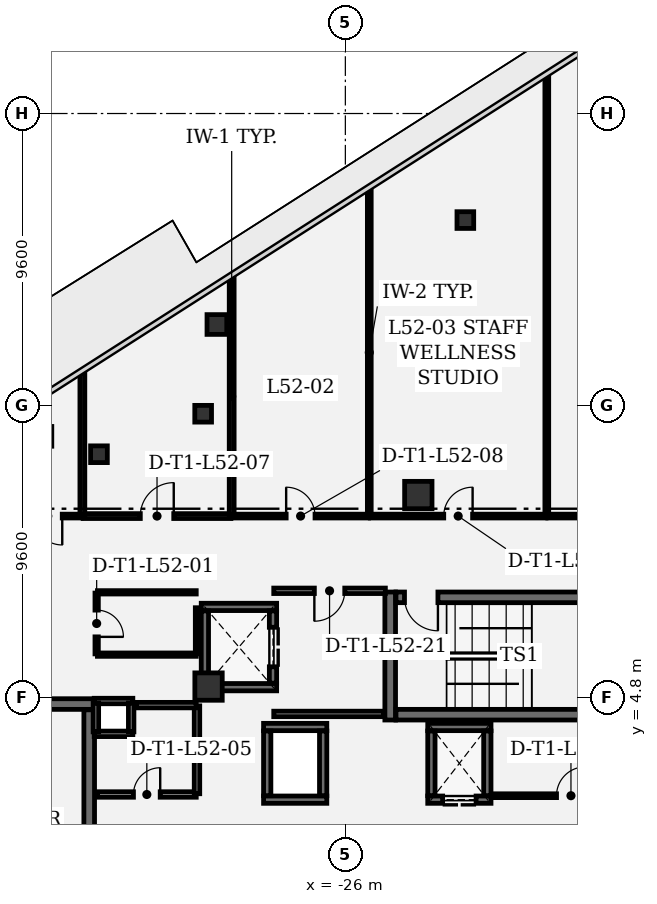
"""IFC4 building model, lengths in metres.
Left out: names, types, materials, properties, quantities, classifications, styles, units other than length and angle.
Written with IfcOpenShell. Run it as: python <this file> out.ifc"""

import sys

from ifc_helpers import new_model, si_unit, direction, frame, frame_2d, origin, origin_2d, place, context, subcontext, project, spatial, rectangle, extrude, element, fill, save


model = new_model("IFC4")
c1 = context("Model", 3, precision=1e-05, world=origin(), true_north=direction((0.0, 1.0)))
c2 = subcontext(c1, "Body", "Model", "MODEL_VIEW")
j1 = project(units=[si_unit("LENGTHUNIT", "METRE"), si_unit("PLANEANGLEUNIT", "RADIAN")], contexts=[c1])
p1 = place(None, origin())
s1 = spatial("IfcSite", under=j1, at=p1, CompositionType="ELEMENT")
p2 = place(p1, origin())
s2 = spatial("IfcBuilding", under=s1, at=p2, CompositionType="ELEMENT")
p3 = place(p2, frame((0.0, 0.0, 225.3)))
s3 = spatial("IfcBuildingStorey", under=s2, at=p3, CompositionType="ELEMENT", Elevation=225.3)
for number, where, z_axis, x_axis in (
    (1, (-23.6, 11.45, 0.0), (0.0, 0.0, 1.0), (1.0, 0.0, 0.0)),
    (2, (-30.5, 5.15, 0.0), (0.0, 0.0, 1.0), (1.0, 0.0, 0.0)),
):
    element("IfcColumn", number, at=place(p3, frame(where, z_axis=z_axis, x_axis=x_axis)), inside=s3, PredefinedType="COLUMN", context=c2, shape_type="SweptSolid", body=[
        extrude(rectangle(XDim=0.9, YDim=0.9, at=origin_2d()), origin(), (0.0, 0.0, 1.0), 4.05),
    ])
p4 = place(p3, frame((-30.225, 17.06, 0.0), z_axis=(0.0, 0.0, 1.0), x_axis=(1.0, 0.0, 0.0)))
e3 = element("IfcColumn", 3, at=p4, inside=s3, PredefinedType="COLUMN", context=c2, shape_type="SweptSolid", body=[
    extrude(rectangle(XDim=0.65, YDim=0.65, at=origin_2d()), origin(), (0.0, 0.0, 1.0), 4.05),
])
for number, where, z_axis, x_axis in (
    (4, (-34.104, 12.792, 0.0), (0.0, 0.0, 1.0), (1.0, 0.0, 0.0)),
    (5, (-22.053, 20.495, 0.0), (0.0, 0.0, 1.0), (1.0, 0.0, 0.0)),
    (6, (-30.677, 14.124, 0.0), (0.0, 0.0, 1.0), (1.0, 0.0, 0.0)),
):
    element("IfcColumn", number, at=place(p3, frame(where, z_axis=z_axis, x_axis=x_axis)), inside=s3, PredefinedType="COLUMN", context=c2, shape_type="SweptSolid", body=[
        extrude(rectangle(XDim=0.55, YDim=0.55, at=origin_2d()), origin(), (0.0, 0.0, 1.0), 4.05),
    ])
p5 = place(p3, frame((-24.525, 8.26, 0.0), z_axis=(0.0, 0.0, 1.0), x_axis=(0.0, -1.0, 0.0)))
e7 = element("IfcWall", 7, at=p5, inside=s3, PredefinedType="SHEAR", context=c2, shape_type="SweptSolid", body=[
    extrude(rectangle(XDim=4.21, YDim=0.35, at=frame_2d((2.105, 0.0))), origin(), (0.0, 0.0, 1.0), 3.78),
])
p6 = place(p3, frame((-24.335, 4.225, 0.0), z_axis=(0.0, 0.0, 1.0), x_axis=(1.0, 0.0, 0.0)))
e8 = element("IfcWall", 8, at=p6, inside=s3, PredefinedType="SHEAR", context=c2, shape_type="SweptSolid", body=[
    extrude(rectangle(XDim=8.12, YDim=0.35, at=frame_2d((4.06, 0.0))), origin(), (0.0, 0.0, 1.0), 3.78),
])
p7 = place(p3, frame((-16.215, 8.085, 0.0), z_axis=(0.0, 0.0, 1.0), x_axis=(-1.0, 0.0, 0.0)))
e9 = element("IfcWall", 9, at=p7, inside=s3, PredefinedType="SHEAR", context=c2, shape_type="SweptSolid", body=[
    extrude(rectangle(XDim=8.12, YDim=0.35, at=frame_2d((4.06, 0.0))), origin(), (0.0, 0.0, 1.0), 3.78),
])
p8 = place(p7, frame((6.74, 0.0, 0.0)))
e10 = element("IfcOpeningElement", 10, at=p8, cuts=e9, PredefinedType="OPENING", context=c2, shape_type="SweptSolid", body=[
    extrude(rectangle(XDim=1.1, YDim=2.2, at=frame_2d((0.55, 1.1))), frame((0.0, 0.185, 0.0), z_axis=(0.0, -1.0, 0.0), x_axis=(1.0, 0.0, 0.0)), (0.0, 0.0, 1.0), 0.37),
])
p9 = place(p3, frame((-34.25, 4.575, 0.0), z_axis=(0.0, 0.0, 1.0), x_axis=(-1.0, 0.0, 0.0)))
e11 = element("IfcWall", 11, at=p9, inside=s3, PredefinedType="SHEAR", context=c2, shape_type="SweptSolid", body=[
    extrude(rectangle(XDim=4.21, YDim=0.35, at=frame_2d((2.105, 0.0))), origin(), (0.0, 0.0, 1.0), 3.78),
])
p10 = place(p3, frame((-34.425, -4.385, 0.0), z_axis=(0.0, 0.0, 1.0), x_axis=(0.0, 1.0, 0.0)))
e12 = element("IfcWall", 12, at=p10, inside=s3, PredefinedType="SHEAR", context=c2, shape_type="SweptSolid", body=[
    extrude(rectangle(XDim=8.77, YDim=0.35, at=frame_2d((4.385, 0.0))), origin(), (0.0, 0.0, 1.0), 3.78),
])
for number, where, z_axis, x_axis in (
    (13, (-28.26, 5.13, 0.0), (0.0, 0.0, 1.0), (-1.0, 0.0, 0.0)),
    (14, (-30.74, 7.77, 0.0), (0.0, 0.0, 1.0), (1.0, 0.0, 0.0)),
):
    element("IfcWall", number, at=place(p3, frame(where, z_axis=z_axis, x_axis=x_axis)), inside=s3, PredefinedType="SHEAR", context=c2, shape_type="SweptSolid", body=[
        extrude(rectangle(XDim=2.48, YDim=0.24, at=frame_2d((1.24, 0.0))), origin(), (0.0, 0.0, 1.0), 3.78),
    ])
p11 = place(p3, frame((-30.62, 5.262, 0.0), z_axis=(0.0, 0.0, 1.0), x_axis=(0.0, 1.0, 0.0)))
e15 = element("IfcWall", 15, at=p11, inside=s3, PredefinedType="SHEAR", context=c2, shape_type="SweptSolid", body=[
    extrude(rectangle(XDim=2.376, YDim=0.24, at=frame_2d((1.188, 0.0))), origin(), (0.0, 0.0, 1.0), 3.78),
])
p12 = place(p3, frame((-28.38, 7.638, 0.0), z_axis=(0.0, 0.0, 1.0), x_axis=(0.0, -1.0, 0.0)))
e16 = element("IfcWall", 16, at=p12, inside=s3, PredefinedType="SHEAR", context=c2, shape_type="SweptSolid", body=[
    extrude(rectangle(XDim=2.376, YDim=0.24, at=frame_2d((1.188, 0.0))), origin(), (0.0, 0.0, 1.0), 3.78),
])
p13 = place(p12, frame((0.538, 0.0, 0.0)))
e17 = element("IfcOpeningElement", 17, at=p13, cuts=e16, PredefinedType="OPENING", context=c2, shape_type="SweptSolid", body=[
    extrude(rectangle(XDim=1.3, YDim=2.3, at=frame_2d((0.65, 1.15))), frame((0.0, 0.13, 0.0), z_axis=(0.0, -1.0, 0.0), x_axis=(1.0, 0.0, 0.0)), (0.0, 0.0, 1.0), 0.26),
])
for number, where, z_axis, x_axis in (
    (18, (-26.61, 1.43, 0.0), (0.0, 0.0, 1.0), (-1.0, 0.0, 0.0)),
    (19, (-28.69, 3.82, 0.0), (0.0, 0.0, 1.0), (1.0, 0.0, 0.0)),
):
    element("IfcWall", number, at=place(p3, frame(where, z_axis=z_axis, x_axis=x_axis)), inside=s3, PredefinedType="SHEAR", context=c2, shape_type="SweptSolid", body=[
        extrude(rectangle(XDim=2.08, YDim=0.24, at=frame_2d((1.04, 0.0))), origin(), (0.0, 0.0, 1.0), 3.78),
    ])
for number, where, z_axis, x_axis in (
    (20, (-28.57, 1.562, 0.0), (0.0, 0.0, 1.0), (0.0, 1.0, 0.0)),
    (21, (-26.73, 3.688, 0.0), (0.0, 0.0, 1.0), (0.0, -1.0, 0.0)),
):
    element("IfcWall", number, at=place(p3, frame(where, z_axis=z_axis, x_axis=x_axis)), inside=s3, PredefinedType="SHEAR", context=c2, shape_type="SweptSolid", body=[
        extrude(rectangle(XDim=2.126, YDim=0.24, at=frame_2d((1.063, 0.0))), origin(), (0.0, 0.0, 1.0), 3.78),
    ])
p14 = place(p3, frame((-21.21, 1.43, 0.0), z_axis=(0.0, 0.0, 1.0), x_axis=(-1.0, 0.0, 0.0)))
e22 = element("IfcWall", 22, at=p14, inside=s3, PredefinedType="SHEAR", context=c2, shape_type="SweptSolid", body=[
    extrude(rectangle(XDim=2.08, YDim=0.24, at=frame_2d((1.04, 0.0))), origin(), (0.0, 0.0, 1.0), 3.78),
])
p15 = place(p14, frame((0.49, 0.0, 0.0)))
e23 = element("IfcOpeningElement", 23, at=p15, cuts=e22, PredefinedType="OPENING", context=c2, shape_type="SweptSolid", body=[
    extrude(rectangle(XDim=1.1, YDim=2.2, at=frame_2d((0.55, 1.1))), frame((0.0, 0.13, 0.0), z_axis=(0.0, -1.0, 0.0), x_axis=(1.0, 0.0, 0.0)), (0.0, 0.0, 1.0), 0.26),
])
p16 = place(p3, frame((-23.29, 3.82, 0.0), z_axis=(0.0, 0.0, 1.0), x_axis=(1.0, 0.0, 0.0)))
e24 = element("IfcWall", 24, at=p16, inside=s3, PredefinedType="SHEAR", context=c2, shape_type="SweptSolid", body=[
    extrude(rectangle(XDim=2.08, YDim=0.24, at=frame_2d((1.04, 0.0))), origin(), (0.0, 0.0, 1.0), 3.78),
])
for number, where, z_axis, x_axis in (
    (25, (-23.17, 1.562, 0.0), (0.0, 0.0, 1.0), (0.0, 1.0, 0.0)),
    (26, (-21.33, 3.688, 0.0), (0.0, 0.0, 1.0), (0.0, -1.0, 0.0)),
):
    element("IfcWall", number, at=place(p3, frame(where, z_axis=z_axis, x_axis=x_axis)), inside=s3, PredefinedType="SHEAR", context=c2, shape_type="SweptSolid", body=[
        extrude(rectangle(XDim=2.126, YDim=0.24, at=frame_2d((1.063, 0.0))), origin(), (0.0, 0.0, 1.0), 3.78),
    ])
for number, where, z_axis, x_axis in (
    (27, (-32.99, 3.595, 0.0), (0.0, 0.0, 1.0), (-1.0, 0.0, 0.0)),
    (28, (-34.26, 4.675, 0.0), (0.0, 0.0, 1.0), (1.0, 0.0, 0.0)),
):
    element("IfcWall", number, at=place(p3, frame(where, z_axis=z_axis, x_axis=x_axis)), inside=s3, PredefinedType="PARTITIONING", context=c2, shape_type="SweptSolid", body=[
        extrude(rectangle(XDim=1.27, YDim=0.18, at=frame_2d((0.635, 0.0))), origin(), (0.0, 0.0, 1.0), 3.78),
    ])
for number, where, z_axis, x_axis in (
    (29, (-34.205, 3.66, 0.0), (0.0, 0.0, 1.0), (0.0, 1.0, 0.0)),
    (30, (-33.045, 4.61, 0.0), (0.0, 0.0, 1.0), (0.0, -1.0, 0.0)),
):
    element("IfcWall", number, at=place(p3, frame(where, z_axis=z_axis, x_axis=x_axis)), inside=s3, PredefinedType="PARTITIONING", context=c2, shape_type="SweptSolid", body=[
        extrude(rectangle(XDim=0.95, YDim=0.18, at=frame_2d((0.475, 0.0))), origin(), (0.0, 0.0, 1.0), 3.78),
    ])
p17 = place(p3, frame((-28.355, 4.25, 0.0), z_axis=(0.0, 0.0, 1.0), x_axis=(1.0, 0.0, 0.0)))
e31 = element("IfcWall", 31, at=p17, inside=s3, PredefinedType="PARTITIONING", context=c2, shape_type="SweptSolid", body=[
    extrude(rectangle(XDim=3.622, YDim=0.18, at=frame_2d((1.811, 0.0))), origin(), (0.0, 0.0, 1.0), 3.78),
])
p18 = place(p3, frame((-24.684, 8.3, 0.0), z_axis=(0.0, 0.0, 1.0), x_axis=(-1.0, 0.0, 0.0)))
e32 = element("IfcWall", 32, at=p18, inside=s3, PredefinedType="PARTITIONING", context=c2, shape_type="SweptSolid", body=[
    extrude(rectangle(XDim=3.671, YDim=0.18, at=frame_2d((1.835, 0.0))), origin(), (0.0, 0.0, 1.0), 3.78),
])
p19 = place(p18, frame((1.335, 0.0, 0.0)))
e33 = element("IfcOpeningElement", 33, at=p19, cuts=e32, PredefinedType="OPENING", context=c2, shape_type="SweptSolid", body=[
    extrude(rectangle(XDim=1.0, YDim=2.15, at=frame_2d((0.5, 1.075))), frame((0.0, 0.1, 0.0), z_axis=(0.0, -1.0, 0.0), x_axis=(1.0, 0.0, 0.0)), (0.0, 0.0, 1.0), 0.2),
])
p20 = place(p3, frame((-34.18, 8.225, 0.0), z_axis=(0.0, 0.0, 1.0), x_axis=(0.0, -1.0, 0.0)))
e34 = element("IfcWall", 34, at=p20, inside=s3, PredefinedType="PARTITIONING", context=c2, shape_type="SweptSolid", body=[
    extrude(rectangle(XDim=2.0, YDim=0.11, at=frame_2d((1.0, 0.0))), origin(), (0.0, 0.0, 1.0), 3.78),
])
p21 = place(p20, frame((0.56, 0.0, 0.0)))
e35 = element("IfcOpeningElement", 35, at=p21, cuts=e34, PredefinedType="OPENING", context=c2, shape_type="SweptSolid", body=[
    extrude(rectangle(XDim=0.88, YDim=2.1, at=frame_2d((0.44, 1.05))), frame((0.0, 0.065, 0.0), z_axis=(0.0, -1.0, 0.0), x_axis=(1.0, 0.0, 0.0)), (0.0, 0.0, 1.0), 0.13),
])
p22 = place(p3, frame((-34.155, 6.2, 0.0), z_axis=(0.0, 0.0, 1.0), x_axis=(1.0, 0.0, 0.0)))
e36 = element("IfcWall", 36, at=p22, inside=s3, PredefinedType="PARTITIONING", context=c2, shape_type="SweptSolid", body=[
    extrude(rectangle(XDim=3.25, YDim=0.11, at=frame_2d((1.625, 0.0))), origin(), (0.0, 0.0, 1.0), 3.344),
])
p23 = place(p3, frame((-30.88, 6.225, 0.0), z_axis=(0.0, 0.0, 1.0), x_axis=(0.0, 1.0, 0.0)))
e37 = element("IfcWall", 37, at=p23, inside=s3, PredefinedType="PARTITIONING", context=c2, shape_type="SweptSolid", body=[
    extrude(rectangle(XDim=1.518, YDim=0.11, at=frame_2d((0.759, 0.0))), origin(), (0.0, 0.0, 1.0), 3.78),
])
p24 = place(p3, frame((-30.905, 8.25, 0.0), z_axis=(0.0, 0.0, 1.0), x_axis=(-1.0, 0.0, 0.0)))
e38 = element("IfcWall", 38, at=p24, inside=s3, PredefinedType="PARTITIONING", context=c2, shape_type="SweptSolid", body=[
    extrude(rectangle(XDim=3.25, YDim=0.11, at=frame_2d((1.625, 0.0))), origin(), (0.0, 0.0, 1.0), 3.78),
])
p25 = place(p3, frame((-21.134, 1.56, 0.0), z_axis=(0.0, 0.0, 1.0), x_axis=(1.0, 0.0, 0.0)))
e39 = element("IfcWall", 39, at=p25, inside=s3, PredefinedType="PARTITIONING", context=c2, shape_type="SweptSolid", body=[
    extrude(rectangle(XDim=5.109, YDim=0.125, at=frame_2d((2.554, 0.0))), origin(), (0.0, 0.0, 1.0), 3.78),
])
p26 = place(p25, frame((2.079, 0.0, 0.0)))
e40 = element("IfcOpeningElement", 40, at=p26, cuts=e39, PredefinedType="OPENING", context=c2, shape_type="SweptSolid", body=[
    extrude(rectangle(XDim=0.95, YDim=2.15, at=frame_2d((0.475, 1.075))), frame((0.0, 0.073, 0.0), z_axis=(0.0, -1.0, 0.0), x_axis=(1.0, 0.0, 0.0)), (0.0, 0.0, 1.0), 0.145),
])
p27 = place(p3, frame((-34.155, 1.6, 0.0), z_axis=(0.0, 0.0, 1.0), x_axis=(1.0, 0.0, 0.0)))
e41 = element("IfcWall", 41, at=p27, inside=s3, PredefinedType="PARTITIONING", context=c2, shape_type="SweptSolid", body=[
    extrude(rectangle(XDim=3.25, YDim=0.18, at=frame_2d((1.625, 0.0))), origin(), (0.0, 0.0, 1.0), 3.78),
])
p28 = place(p27, frame((1.185, 0.0, 0.0)))
e42 = element("IfcOpeningElement", 42, at=p28, cuts=e41, PredefinedType="OPENING", context=c2, shape_type="SweptSolid", body=[
    extrude(rectangle(XDim=0.88, YDim=2.1, at=frame_2d((0.44, 1.05))), frame((0.0, 0.1, 0.0), z_axis=(0.0, -1.0, 0.0), x_axis=(1.0, 0.0, 0.0)), (0.0, 0.0, 1.0), 0.2),
])
p29 = place(p3, frame((-30.88, 1.625, 0.0), z_axis=(0.0, 0.0, 1.0), x_axis=(0.0, 1.0, 0.0)))
e43 = element("IfcWall", 43, at=p29, inside=s3, PredefinedType="PARTITIONING", context=c2, shape_type="SweptSolid", body=[
    extrude(rectangle(XDim=2.89, YDim=0.18, at=frame_2d((1.445, 0.0))), origin(), (0.0, 0.0, 1.0), 3.78),
])
p30 = place(p3, frame((-30.905, 4.54, 0.0), z_axis=(0.0, 0.0, 1.0), x_axis=(-1.0, 0.0, 0.0)))
e44 = element("IfcWall", 44, at=p30, inside=s3, PredefinedType="PARTITIONING", context=c2, shape_type="SweptSolid", body=[
    extrude(rectangle(XDim=1.975, YDim=0.18, at=frame_2d((0.988, 0.0))), origin(), (0.0, 0.0, 1.0), 3.78),
])
p31 = place(p3, frame((-34.625, 10.758, 0.0), z_axis=(0.0, 0.0, 1.0), x_axis=(1.0, 0.0, 0.0)))
e45 = element("IfcWall", 45, at=p31, inside=s3, PredefinedType="PARTITIONING", context=c2, shape_type="SweptSolid", body=[
    extrude(rectangle(XDim=4.861, YDim=0.16, at=frame_2d((2.431, 0.0))), origin(), (0.0, 0.0, 1.0), 3.0),
])
p32 = place(p31, frame((1.881, 0.0, 0.0)))
e46 = element("IfcOpeningElement", 46, at=p32, cuts=e45, PredefinedType="OPENING", context=c2, shape_type="SweptSolid", body=[
    extrude(rectangle(XDim=1.1, YDim=2.15, at=frame_2d((0.55, 1.075))), frame((0.0, 0.09, 0.0), z_axis=(0.0, -1.0, 0.0), x_axis=(1.0, 0.0, 0.0)), (0.0, 0.0, 1.0), 0.18),
])
p33 = place(p3, frame((-29.739, 10.783, 0.0), z_axis=(0.0, 0.0, 1.0), x_axis=(0.0, 1.0, 0.0)))
e47 = element("IfcWall", 47, at=p33, inside=s3, PredefinedType="PARTITIONING", context=c2, shape_type="SweptSolid", body=[
    extrude(rectangle(XDim=7.818, YDim=0.16, at=frame_2d((3.909, 0.0))), origin(), (0.0, 0.0, 1.0), 3.78),
])
p34 = place(p3, frame((-34.65, 15.462, 0.0), z_axis=(0.0, 0.0, 1.0), x_axis=(0.0, -1.0, 0.0)))
e48 = element("IfcWall", 48, at=p34, inside=s3, PredefinedType="PARTITIONING", context=c2, shape_type="SweptSolid", body=[
    extrude(rectangle(XDim=4.679, YDim=0.16, at=frame_2d((2.339, 0.0))), origin(), (0.0, 0.0, 1.0), 3.78),
])
p35 = place(p3, frame((-29.706, 10.758, 0.0), z_axis=(0.0, 0.0, 1.0), x_axis=(1.0, 0.0, 0.0)))
e49 = element("IfcWall", 49, at=p35, inside=s3, PredefinedType="PARTITIONING", context=c2, shape_type="SweptSolid", body=[
    extrude(rectangle(XDim=4.468, YDim=0.125, at=frame_2d((2.234, 0.0))), origin(), (0.0, 0.0, 1.0), 3.78),
])
p36 = place(p35, frame((1.759, 0.0, 0.0)))
e50 = element("IfcOpeningElement", 50, at=p36, cuts=e49, PredefinedType="OPENING", context=c2, shape_type="SweptSolid", body=[
    extrude(rectangle(XDim=0.95, YDim=2.15, at=frame_2d((0.475, 1.075))), frame((0.0, 0.073, 0.0), z_axis=(0.0, -1.0, 0.0), x_axis=(1.0, 0.0, 0.0)), (0.0, 0.0, 1.0), 0.145),
])
p37 = place(p3, frame((-25.213, 10.783, 0.0), z_axis=(0.0, 0.0, 1.0), x_axis=(0.0, 1.0, 0.0)))
e51 = element("IfcWall", 51, at=p37, inside=s3, PredefinedType="PARTITIONING", context=c2, shape_type="SweptSolid", body=[
    extrude(rectangle(XDim=10.71, YDim=0.125, at=frame_2d((5.355, 0.0))), origin(), (0.0, 0.0, 1.0), 3.78),
])
p38 = place(p3, frame((-25.18, 10.758, 0.0), z_axis=(0.0, 0.0, 1.0), x_axis=(1.0, 0.0, 0.0)))
e52 = element("IfcWall", 52, at=p38, inside=s3, PredefinedType="PARTITIONING", context=c2, shape_type="SweptSolid", body=[
    extrude(rectangle(XDim=5.781, YDim=0.125, at=frame_2d((2.89, 0.0))), origin(), (0.0, 0.0, 1.0), 3.78),
])
p39 = place(p38, frame((2.415, 0.0, 0.0)))
e53 = element("IfcOpeningElement", 53, at=p39, cuts=e52, PredefinedType="OPENING", context=c2, shape_type="SweptSolid", body=[
    extrude(rectangle(XDim=0.95, YDim=2.15, at=frame_2d((0.475, 1.075))), frame((0.0, 0.073, 0.0), z_axis=(0.0, -1.0, 0.0), x_axis=(1.0, 0.0, 0.0)), (0.0, 0.0, 1.0), 0.145),
])
p40 = place(p3, frame((-19.374, 10.783, 0.0), z_axis=(0.0, 0.0, 1.0), x_axis=(0.0, 1.0, 0.0)))
e54 = element("IfcWall", 54, at=p40, inside=s3, PredefinedType="PARTITIONING", context=c2, shape_type="SweptSolid", body=[
    extrude(rectangle(XDim=14.442, YDim=0.125, at=frame_2d((7.221, 0.0))), origin(), (0.0, 0.0, 1.0), 2.977),
])
p41 = place(p3, frame((-19.341, 10.758, 0.0), z_axis=(0.0, 0.0, 1.0), x_axis=(1.0, 0.0, 0.0)))
e55 = element("IfcWall", 55, at=p41, inside=s3, PredefinedType="PARTITIONING", context=c2, shape_type="SweptSolid", body=[
    extrude(rectangle(XDim=6.166, YDim=0.125, at=frame_2d((3.083, 0.0))), origin(), (0.0, 0.0, 1.0), 3.344),
])
p42 = place(p41, frame((2.981, 0.0, 0.0)))
e56 = element("IfcOpeningElement", 56, at=p42, cuts=e55, PredefinedType="OPENING", context=c2, shape_type="SweptSolid", body=[
    extrude(rectangle(XDim=0.95, YDim=2.15, at=frame_2d((0.475, 1.075))), frame((0.0, 0.073, 0.0), z_axis=(0.0, -1.0, 0.0), x_axis=(1.0, 0.0, 0.0)), (0.0, 0.0, 1.0), 0.145),
])
p43 = place(p3, frame((-34.683, 10.758, 0.0), z_axis=(0.0, 0.0, 1.0), x_axis=(-1.0, 0.0, 0.0)))
e57 = element("IfcWall", 57, at=p43, inside=s3, PredefinedType="PARTITIONING", context=c2, shape_type="SweptSolid", body=[
    extrude(rectangle(XDim=3.15, YDim=0.125, at=frame_2d((1.575, 0.0))), origin(), (0.0, 0.0, 1.0), 3.0),
])
p44 = place(p43, frame((0.629, 0.0, 0.0)))
e58 = element("IfcOpeningElement", 58, at=p44, cuts=e57, PredefinedType="OPENING", context=c2, shape_type="SweptSolid", body=[
    extrude(rectangle(XDim=0.95, YDim=2.15, at=frame_2d((0.475, 1.075))), frame((0.0, 0.073, 0.0), z_axis=(0.0, -1.0, 0.0), x_axis=(1.0, 0.0, 0.0)), (0.0, 0.0, 1.0), 0.145),
])
p45 = place(p8, origin())
e59 = element("IfcDoor", 59, at=p45, inside=s3, OperationType="SINGLE_SWING_LEFT", PredefinedType="DOOR", context=c2, shape_type="SweptSolid", body=[
    extrude(rectangle(XDim=1.1, YDim=2.2, at=frame_2d((0.55, 1.1))), frame((0.0, 0.025, 0.0), z_axis=(0.0, -1.0, 0.0), x_axis=(1.0, 0.0, 0.0)), (0.0, 0.0, 1.0), 0.05),
])
fill(e10, e59)
p46 = place(p13, origin())
e60 = element("IfcDoor", 60, at=p46, inside=s3, OperationType="DOUBLE_DOOR_SLIDING", PredefinedType="DOOR", context=c2, shape_type="SweptSolid", body=[
    extrude(rectangle(XDim=1.3, YDim=2.3, at=frame_2d((0.65, 1.15))), frame((0.0, 0.025, 0.0), z_axis=(0.0, -1.0, 0.0), x_axis=(1.0, 0.0, 0.0)), (0.0, 0.0, 1.0), 0.05),
])
fill(e17, e60)
p47 = place(p15, origin())
e61 = element("IfcDoor", 61, at=p47, inside=s3, OperationType="DOUBLE_DOOR_SLIDING", PredefinedType="DOOR", context=c2, shape_type="SweptSolid", body=[
    extrude(rectangle(XDim=1.1, YDim=2.2, at=frame_2d((0.55, 1.1))), frame((0.0, 0.025, 0.0), z_axis=(0.0, -1.0, 0.0), x_axis=(1.0, 0.0, 0.0)), (0.0, 0.0, 1.0), 0.05),
])
fill(e23, e61)
p48 = place(p21, origin())
e62 = element("IfcDoor", 62, at=p48, inside=s3, OperationType="SINGLE_SWING_RIGHT", PredefinedType="DOOR", context=c2, shape_type="SweptSolid", body=[
    extrude(rectangle(XDim=0.88, YDim=2.1, at=frame_2d((0.44, 1.05))), frame((0.0, 0.025, 0.0), z_axis=(0.0, -1.0, 0.0), x_axis=(1.0, 0.0, 0.0)), (0.0, 0.0, 1.0), 0.05),
])
fill(e35, e62)
p49 = place(p26, origin())
e63 = element("IfcDoor", 63, at=p49, inside=s3, OperationType="SINGLE_SWING_RIGHT", PredefinedType="DOOR", context=c2, shape_type="SweptSolid", body=[
    extrude(rectangle(XDim=0.95, YDim=2.15, at=frame_2d((0.475, 1.075))), frame((0.0, 0.025, 0.0), z_axis=(0.0, -1.0, 0.0), x_axis=(1.0, 0.0, 0.0)), (0.0, 0.0, 1.0), 0.05),
])
fill(e40, e63)
p50 = place(p28, origin())
e64 = element("IfcDoor", 64, at=p50, inside=s3, OperationType="SINGLE_SWING_RIGHT", PredefinedType="DOOR", context=c2, shape_type="SweptSolid", body=[
    extrude(rectangle(XDim=0.88, YDim=2.1, at=frame_2d((0.44, 1.05))), frame((0.0, 0.025, 0.0), z_axis=(0.0, -1.0, 0.0), x_axis=(1.0, 0.0, 0.0)), (0.0, 0.0, 1.0), 0.05),
])
fill(e42, e64)
p51 = place(p32, origin())
e65 = element("IfcDoor", 65, at=p51, inside=s3, OperationType="SINGLE_SWING_RIGHT", PredefinedType="DOOR", context=c2, shape_type="SweptSolid", body=[
    extrude(rectangle(XDim=1.1, YDim=2.15, at=frame_2d((0.55, 1.075))), frame((0.0, 0.025, 0.0), z_axis=(0.0, -1.0, 0.0), x_axis=(1.0, 0.0, 0.0)), (0.0, 0.0, 1.0), 0.05),
])
fill(e46, e65)
p52 = place(p36, origin())
e66 = element("IfcDoor", 66, at=p52, inside=s3, OperationType="SINGLE_SWING_LEFT", PredefinedType="DOOR", context=c2, shape_type="SweptSolid", body=[
    extrude(rectangle(XDim=0.95, YDim=2.15, at=frame_2d((0.475, 1.075))), frame((0.0, 0.025, 0.0), z_axis=(0.0, -1.0, 0.0), x_axis=(1.0, 0.0, 0.0)), (0.0, 0.0, 1.0), 0.05),
])
fill(e50, e66)
p53 = place(p39, origin())
e67 = element("IfcDoor", 67, at=p53, inside=s3, OperationType="SINGLE_SWING_RIGHT", PredefinedType="DOOR", context=c2, shape_type="SweptSolid", body=[
    extrude(rectangle(XDim=0.95, YDim=2.15, at=frame_2d((0.475, 1.075))), frame((0.0, 0.025, 0.0), z_axis=(0.0, -1.0, 0.0), x_axis=(1.0, 0.0, 0.0)), (0.0, 0.0, 1.0), 0.05),
])
fill(e53, e67)
p54 = place(p44, origin())
e68 = element("IfcDoor", 68, at=p54, inside=s3, OperationType="SINGLE_SWING_LEFT", PredefinedType="DOOR", context=c2, shape_type="SweptSolid", body=[
    extrude(rectangle(XDim=0.95, YDim=2.15, at=frame_2d((0.475, 1.075))), frame((0.0, 0.025, 0.0), z_axis=(0.0, -1.0, 0.0), x_axis=(1.0, 0.0, 0.0)), (0.0, 0.0, 1.0), 0.05),
])
fill(e58, e68)
p55 = place(p19, origin())
e69 = element("IfcDoor", 69, at=p55, inside=s3, OperationType="SINGLE_SWING_RIGHT", PredefinedType="DOOR", context=c2, shape_type="SweptSolid", body=[
    extrude(rectangle(XDim=1.0, YDim=2.15, at=frame_2d((0.5, 1.075))), frame((0.0, 0.025, 0.0), z_axis=(0.0, -1.0, 0.0), x_axis=(1.0, 0.0, 0.0)), (0.0, 0.0, 1.0), 0.05),
])
fill(e33, e69)
save(model, sys.argv[1])
